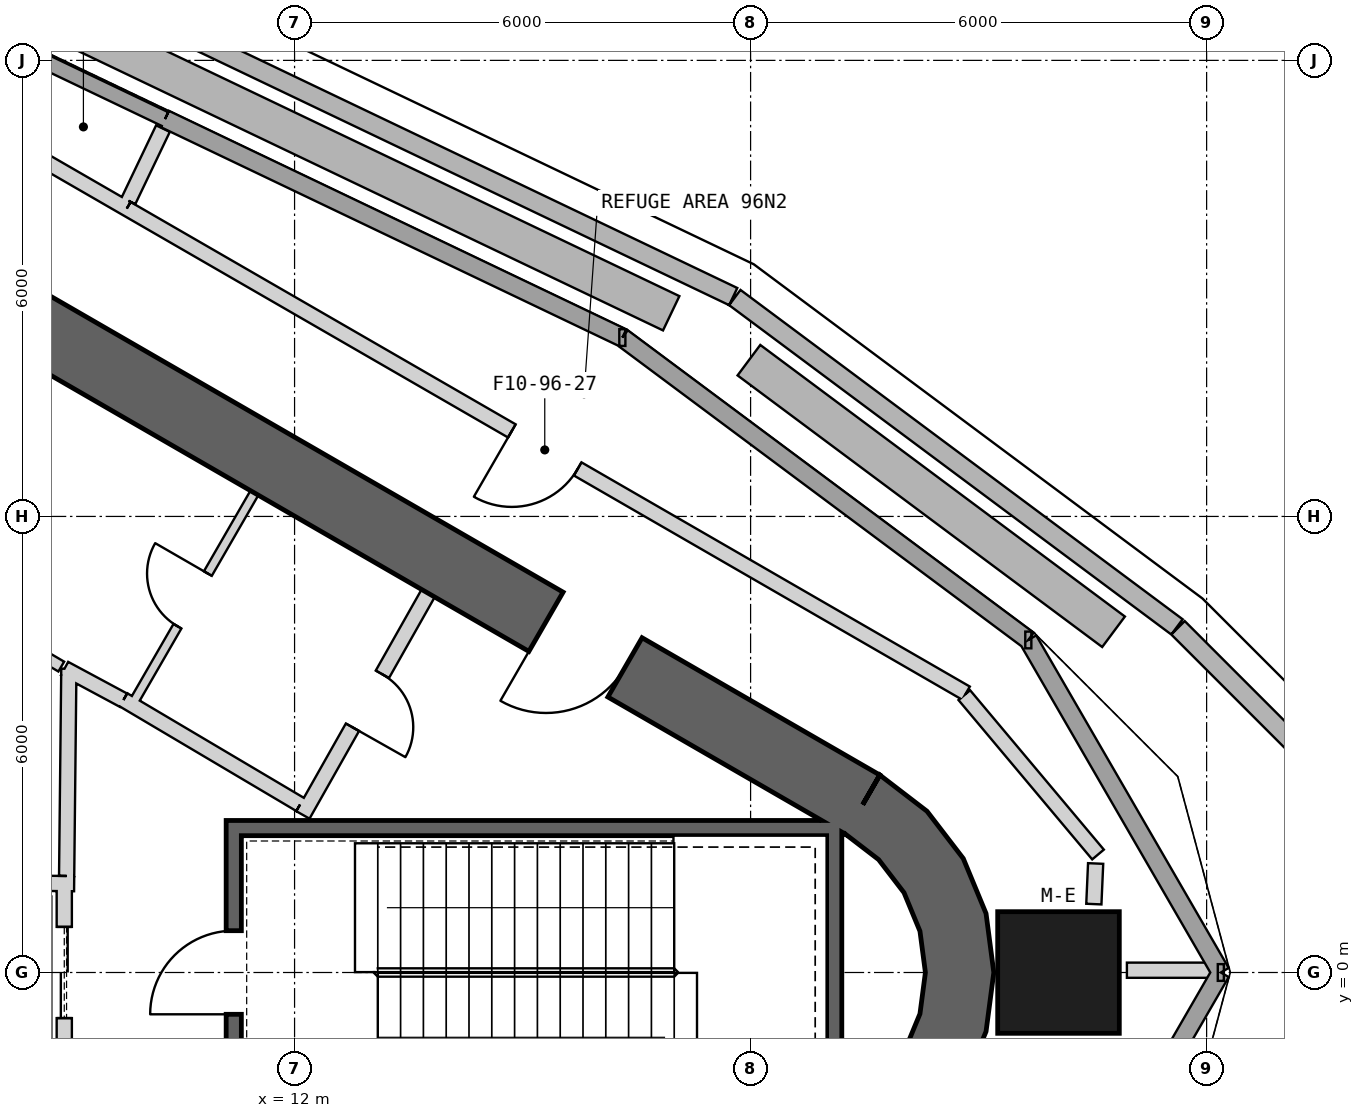
"""IFC4 building model, lengths in metres.
Left out: names, types, materials, properties, quantities, classifications, styles, units other than length and angle.
Written with IfcOpenShell. Run it as: python <this file> out.ifc"""

import sys

from ifc_helpers import new_model, si_unit, direction, frame, frame_2d, origin, origin_2d, place, context, subcontext, project, spatial, polyline, rectangle, outline, extrude, element, fill, save


model = new_model("IFC4")
c1 = context("Model", 3, precision=1e-05, world=origin(), true_north=direction((0.0, 1.0)))
c2 = subcontext(c1, "Body", "Model", "MODEL_VIEW")
j1 = project(units=[si_unit("LENGTHUNIT", "METRE"), si_unit("PLANEANGLEUNIT", "RADIAN")], contexts=[c1])
p1 = place(None, origin())
s1 = spatial("IfcSite", under=j1, at=p1, CompositionType="ELEMENT")
p2 = place(p1, origin())
s2 = spatial("IfcBuilding", under=s1, at=p2, CompositionType="ELEMENT")
p3 = place(p2, frame((0.0, 0.0, 425.3)))
s3 = spatial("IfcBuildingStorey", under=s2, at=p3, CompositionType="ELEMENT", Elevation=425.3)
p4 = place(p3, frame((22.051, 0.0, -0.25), z_axis=(0.0, 0.0, 1.0), x_axis=(1.0, 0.0, 0.0)))
e1 = element("IfcColumn", 1, at=p4, inside=s3, PredefinedType="COLUMN", context=c2, shape_type="SweptSolid", body=[
    extrude(rectangle(XDim=1.6, YDim=1.6, at=origin_2d()), origin(), (0.0, 0.0, 1.0), 5.25),
])
p5 = place(p3, frame((19.475, 2.208, 0.0), z_axis=(0.0, 0.0, 1.0), x_axis=(-0.866028369851, 0.499994862586, 0.0)))
e2 = element("IfcWall", 2, at=p5, inside=s3, PredefinedType="SHEAR", context=c2, shape_type="SweptSolid", body=[
    extrude(rectangle(XDim=31.523, YDim=0.9, at=frame_2d((15.762, 0.0))), origin(), (0.0, 0.0, 1.0), 5.0),
])
p6 = place(p5, frame((3.612, 0.0, 0.0)))
e3 = element("IfcOpeningElement", 3, at=p6, cuts=e2, PredefinedType="OPENING", context=c2, shape_type="SweptSolid", body=[
    extrude(rectangle(XDim=1.2, YDim=2.4, at=frame_2d((0.6, 1.2))), frame((0.0, 0.46, 0.0), z_axis=(0.0, -1.0, 0.0), x_axis=(1.0, 0.0, 0.0)), (0.0, 0.0, 1.0), 0.92),
])
p7 = place(p5, frame((26.712, 0.0, 0.0)))
e4 = element("IfcOpeningElement", 4, at=p7, cuts=e2, PredefinedType="OPENING", context=c2, shape_type="SweptSolid", body=[
    extrude(rectangle(XDim=1.2, YDim=2.4, at=frame_2d((0.6, 1.2))), frame((0.0, 0.46, 0.0), z_axis=(0.0, -1.0, 0.0), x_axis=(1.0, 0.0, 0.0)), (0.0, 0.0, 1.0), 0.92),
])
p8 = place(p3, origin())
e5 = element("IfcWall", 5, at=p8, inside=s3, PredefinedType="SHEAR", context=c2, shape_type="SweptSolid", body=[
    extrude(outline(polyline([(19.7, -2.598), (20.321, -2.121), (20.798, -1.5), (21.098, -0.777), (21.2, 0.0), (21.098, 0.777), (20.798, 1.5), (20.321, 2.121), (19.7, 2.598), (19.25, 1.819), (19.685, 1.485), (20.019, 1.05), (20.229, 0.543), (20.3, 0.0), (20.229, -0.543), (20.019, -1.05), (19.685, -1.485), (19.25, -1.819), (19.7, -2.598)])), origin(), (0.0, 0.0, 1.0), 5.0),
])
p9 = place(p3, frame((21.654, 4.375, 0.0), z_axis=(0.0, 0.0, 1.0), x_axis=(-0.802005747834, 0.597316315231, 0.0)))
e6 = element("IfcWall", 6, at=p9, inside=s3, PredefinedType="SOLIDWALL", context=c2, shape_type="SweptSolid", body=[
    extrude(rectangle(XDim=6.66, YDim=0.24, at=frame_2d((3.33, 0.0))), origin(), (0.0, 0.0, 1.0), 4.75),
])
p10 = place(p3, frame((16.312, 8.353, 0.0), z_axis=(0.0, 0.0, 1.0), x_axis=(-0.902308246331, 0.431091438795, 0.0)))
e7 = element("IfcWall", 7, at=p10, inside=s3, PredefinedType="SOLIDWALL", context=c2, shape_type="SweptSolid", body=[
    extrude(rectangle(XDim=6.668, YDim=0.24, at=frame_2d((3.334, 0.0))), origin(), (0.0, 0.0, 1.0), 4.75),
])
p11 = place(p3, frame((21.664, -4.365, 0.0), z_axis=(0.0, 0.0, 1.0), x_axis=(0.500383284559, 0.865804001223, 0.0)))
e8 = element("IfcWall", 8, at=p11, inside=s3, PredefinedType="SOLIDWALL", context=c2, shape_type="SweptSolid", body=[
    extrude(rectangle(XDim=5.042, YDim=0.24, at=frame_2d((2.521, 0.0))), origin(), (0.0, 0.0, 1.0), 4.75),
])
p12 = place(p3, frame((24.187, 0.0, 0.0), z_axis=(0.0, 0.0, 1.0), x_axis=(-0.501009618021, 0.86544171534, 0.0)))
e9 = element("IfcWall", 9, at=p12, inside=s3, PredefinedType="SOLIDWALL", context=c2, shape_type="SweptSolid", body=[
    extrude(rectangle(XDim=5.055, YDim=0.24, at=frame_2d((2.528, 0.0))), origin(), (0.0, 0.0, 1.0), 4.75),
])
p13 = place(p3, frame((10.295, 11.228, 0.0), z_axis=(0.0, 0.0, 1.0), x_axis=(-0.902319256172, 0.431068393577, 0.0)))
e10 = element("IfcWall", 10, at=p13, inside=s3, PredefinedType="SOLIDWALL", context=c2, shape_type="SweptSolid", body=[
    extrude(rectangle(XDim=6.629, YDim=0.2, at=frame_2d((3.314, 0.0))), origin(), (0.0, 0.0, 1.0), 4.75),
])
p14 = place(p13, frame((2.414, 0.0, 0.0)))
e11 = element("IfcOpeningElement", 11, at=p14, cuts=e10, PredefinedType="OPENING", context=c2, shape_type="SweptSolid", body=[
    extrude(rectangle(XDim=1.8, YDim=2.4, at=frame_2d((0.9, 1.2))), frame((0.0, 0.11, 0.0), z_axis=(0.0, -1.0, 0.0), x_axis=(1.0, 0.0, 0.0)), (0.0, 0.0, 1.0), 0.22),
])
p15 = place(p3, frame((23.624, 4.535, 0.04), z_axis=(0.0, 0.0, 1.0), x_axis=(0.707106781187, -0.707106781187, 0.0)))
e12 = element("IfcWall", 12, at=p15, inside=s3, PredefinedType="PARAPET", context=c2, shape_type="SweptSolid", body=[
    extrude(rectangle(XDim=2.728, YDim=0.25, at=frame_2d((1.364, 0.0))), origin(), (0.0, 0.0, 1.0), 1.2),
])
p16 = place(p3, frame((-2.057, 18.365, 0.04), z_axis=(0.0, 0.0, 1.0), x_axis=(0.90231764466, -0.431071766804, 0.0)))
e13 = element("IfcWall", 13, at=p16, inside=s3, PredefinedType="PARAPET", context=c2, shape_type="SweptSolid", body=[
    extrude(rectangle(XDim=21.975, YDim=0.25, at=frame_2d((10.987, 0.0))), origin(), (0.0, 0.0, 1.0), 1.2),
])
p17 = place(p3, frame((17.792, 8.88, 0.04), z_axis=(0.0, 0.0, 1.0), x_axis=(0.801990625962, -0.597336618557, 0.0)))
e14 = element("IfcWall", 14, at=p17, inside=s3, PredefinedType="PARAPET", context=c2, shape_type="SweptSolid", body=[
    extrude(rectangle(XDim=7.254, YDim=0.25, at=frame_2d((3.627, 0.0))), origin(), (0.0, 0.0, 1.0), 1.2),
])
p18 = place(p3, frame((-1.812, 17.639, 0.04), z_axis=(0.0, 0.0, 1.0), x_axis=(0.902316498724, -0.431074165463, 0.0)))
e15 = element("IfcWall", 15, at=p18, inside=s3, PredefinedType="PARAPET", context=c2, shape_type="SweptSolid", body=[
    extrude(rectangle(XDim=20.799, YDim=0.5, at=frame_2d((10.399, 0.0))), origin(), (0.0, 0.0, 1.0), 0.6),
])
p19 = place(p3, frame((17.978, 8.056, 0.04), z_axis=(0.0, 0.0, 1.0), x_axis=(0.801984037466, -0.597345464242, 0.0)))
e16 = element("IfcWall", 16, at=p19, inside=s3, PredefinedType="PARAPET", context=c2, shape_type="SweptSolid", body=[
    extrude(rectangle(XDim=5.982, YDim=0.5, at=frame_2d((2.991, 0.0))), origin(), (0.0, 0.0, 1.0), 0.6),
])
p20 = place(p3, frame((19.2, 1.9, -0.25), z_axis=(0.0, 0.0, 1.0), x_axis=(-1.0, 0.0, 0.0)))
e17 = element("IfcWall", 17, at=p20, inside=s3, PredefinedType="SHEAR", context=c2, shape_type="SweptSolid", body=[
    extrude(rectangle(XDim=8.1, YDim=0.2, at=frame_2d((4.05, 0.0))), origin(), (0.0, 0.0, 1.0), 5.0),
])
p21 = place(p3, frame((19.1, -2.0, -0.25), z_axis=(0.0, 0.0, 1.0), x_axis=(0.0, 1.0, 0.0)))
e18 = element("IfcWall", 18, at=p21, inside=s3, PredefinedType="SHEAR", context=c2, shape_type="SweptSolid", body=[
    extrude(rectangle(XDim=3.8, YDim=0.2, at=frame_2d((1.9, 0.0))), origin(), (0.0, 0.0, 1.0), 5.0),
])
p22 = place(p3, frame((11.2, -1.8, -0.25), z_axis=(0.0, 0.0, 1.0), x_axis=(0.0, 1.0, 0.0)))
e19 = element("IfcWall", 19, at=p22, inside=s3, PredefinedType="SHEAR", context=c2, shape_type="SweptSolid", body=[
    extrude(rectangle(XDim=3.6, YDim=0.2, at=frame_2d((1.8, 0.0))), origin(), (0.0, 0.0, 1.0), 5.0),
])
p23 = place(p22, frame((1.25, 0.0, 0.25)))
e20 = element("IfcOpeningElement", 20, at=p23, cuts=e19, PredefinedType="OPENING", context=c2, shape_type="SweptSolid", body=[
    extrude(rectangle(XDim=1.1, YDim=2.1, at=frame_2d((0.55, 1.05))), frame((0.0, 0.11, 0.0), z_axis=(0.0, -1.0, 0.0), x_axis=(1.0, 0.0, 0.0)), (0.0, 0.0, 1.0), 0.22),
])
p24 = place(p3, frame((8.97, 1.2, 0.0), z_axis=(0.0, 0.0, 1.0), x_axis=(0.0, -1.0, 0.0)))
e21 = element("IfcWall", 21, at=p24, inside=s3, PredefinedType="PLUMBINGWALL", context=c2, shape_type="SweptSolid", body=[
    extrude(rectangle(XDim=2.4, YDim=0.2, at=frame_2d((1.2, 0.0))), origin(), (0.0, 0.0, 1.0), 4.75),
])
p25 = place(p24, frame((0.6, 0.0, 0.0)))
e22 = element("IfcOpeningElement", 22, at=p25, cuts=e21, PredefinedType="OPENING", context=c2, shape_type="SweptSolid", body=[
    extrude(rectangle(XDim=1.2, YDim=2.4, at=frame_2d((0.6, 1.2))), frame((0.0, 0.11, 0.0), z_axis=(0.0, -1.0, 0.0), x_axis=(1.0, 0.0, 0.0)), (0.0, 0.0, 1.0), 0.22),
])
p26 = place(p3, frame((5.9, 1.201, 0.0), z_axis=(0.0, 0.0, 1.0), x_axis=(0.999950064753, -0.009993397809, 0.0)))
e23 = element("IfcWall", 23, at=p26, inside=s3, PredefinedType="PLUMBINGWALL", context=c2, shape_type="SweptSolid", body=[
    extrude(rectangle(XDim=3.2, YDim=0.2, at=frame_2d((1.6, 0.0))), origin(), (0.0, 0.0, 1.0), 4.75),
])
p27 = place(p3, frame((9.847, 3.495, 0.0), z_axis=(0.0, 0.0, 1.0), x_axis=(0.499984717929, 0.866034226713, 0.0)))
e24 = element("IfcWall", 24, at=p27, inside=s3, PredefinedType="PARTITIONING", context=c2, shape_type="SweptSolid", body=[
    extrude(rectangle(XDim=3.25, YDim=0.12, at=frame_2d((1.625, 0.0))), origin(), (0.0, 0.0, 1.0), 4.75),
])
p28 = place(p27, frame((1.225, 0.0, 0.0)))
e25 = element("IfcOpeningElement", 25, at=p28, cuts=e24, PredefinedType="OPENING", context=c2, shape_type="SweptSolid", body=[
    extrude(rectangle(XDim=0.8, YDim=2.1, at=frame_2d((0.4, 1.05))), frame((0.0, 0.07, 0.0), z_axis=(0.0, -1.0, 0.0), x_axis=(1.0, 0.0, 0.0)), (0.0, 0.0, 1.0), 0.14),
])
p29 = place(p3, frame((12.11, 2.073, 0.0), z_axis=(0.0, 0.0, 1.0), x_axis=(0.49196600604, 0.870614408852, 0.0)))
e26 = element("IfcWall", 26, at=p29, inside=s3, PredefinedType="PARTITIONING", context=c2, shape_type="SweptSolid", body=[
    extrude(rectangle(XDim=3.35, YDim=0.2, at=frame_2d((1.675, 0.0))), origin(), (0.0, 0.0, 1.0), 4.75),
])
p30 = place(p29, frame((1.325, 0.0, 0.0)))
e27 = element("IfcOpeningElement", 27, at=p30, cuts=e26, PredefinedType="OPENING", context=c2, shape_type="SweptSolid", body=[
    extrude(rectangle(XDim=0.8, YDim=2.1, at=frame_2d((0.4, 1.05))), frame((0.0, 0.11, 0.0), z_axis=(0.0, -1.0, 0.0), x_axis=(1.0, 0.0, 0.0)), (0.0, 0.0, 1.0), 0.22),
])
p31 = place(p3, frame((9.75, 3.587, 0.0), z_axis=(0.0, 0.0, 1.0), x_axis=(0.860414880418, -0.509594185166, 0.0)))
e28 = element("IfcWall", 28, at=p31, inside=s3, PredefinedType="PARTITIONING", context=c2, shape_type="SweptSolid", body=[
    extrude(rectangle(XDim=2.7, YDim=0.2, at=frame_2d((1.35, 0.0))), origin(), (0.0, 0.0, 1.0), 4.75),
])
p32 = place(p3, frame((8.974, 3.999, 0.0), z_axis=(0.0, 0.0, 1.0), x_axis=(0.880917147855, -0.473270513147, 0.0)))
e29 = element("IfcWall", 29, at=p32, inside=s3, PredefinedType="PARTITIONING", context=c2, shape_type="SweptSolid", body=[
    extrude(rectangle(XDim=0.878, YDim=0.2, at=frame_2d((0.439, 0.0))), origin(), (0.0, 0.0, 1.0), 4.75),
])
p33 = place(p3, frame((8.931, 4.025, 0.0), z_axis=(0.0, 0.0, 1.0), x_axis=(-0.862666884027, 0.505772525157, 0.0)))
e30 = element("IfcWall", 30, at=p33, inside=s3, PredefinedType="PLUMBINGWALL", context=c2, shape_type="SweptSolid", body=[
    extrude(rectangle(XDim=4.372, YDim=0.15, at=frame_2d((2.186, 0.0))), origin(), (0.0, 0.0, 1.0), 4.75),
])
p34 = place(p3, frame((9.001, 1.27, 0.0), z_axis=(0.0, 0.0, 1.0), x_axis=(0.01074821465, 0.999942236273, 0.0)))
e31 = element("IfcWall", 31, at=p34, inside=s3, PredefinedType="PARTITIONING", context=c2, shape_type="SweptSolid", body=[
    extrude(rectangle(XDim=2.726, YDim=0.2, at=frame_2d((1.363, 0.0))), origin(), (0.0, 0.0, 1.0), 4.75),
])
p35 = place(p3, frame((20.834, 3.675, 0.0), z_axis=(0.0, 0.0, 1.0), x_axis=(-0.866033490305, 0.499985993474, 0.0)))
e32 = element("IfcWall", 32, at=p35, inside=s3, PredefinedType="PARTITIONING", context=c2, shape_type="SweptSolid", body=[
    extrude(rectangle(XDim=12.75, YDim=0.2, at=frame_2d((6.375, 0.0))), origin(), (0.0, 0.0, 1.0), 4.75),
])
p36 = place(p35, frame((5.9, 0.0, 0.0)))
e33 = element("IfcOpeningElement", 33, at=p36, cuts=e32, PredefinedType="OPENING", context=c2, shape_type="SweptSolid", body=[
    extrude(rectangle(XDim=1.0, YDim=2.1, at=frame_2d((0.5, 1.05))), frame((0.0, 0.11, 0.0), z_axis=(0.0, -1.0, 0.0), x_axis=(1.0, 0.0, 0.0)), (0.0, 0.0, 1.0), 0.22),
])
p37 = place(p3, frame((9.792, 10.05, 0.0), z_axis=(0.0, 0.0, 1.0), x_axis=(-0.866022320763, 0.500005339912, 0.0)))
e34 = element("IfcWall", 34, at=p37, inside=s3, PredefinedType="PARTITIONING", context=c2, shape_type="SweptSolid", body=[
    extrude(rectangle(XDim=6.649, YDim=0.2, at=frame_2d((3.324, 0.0))), origin(), (0.0, 0.0, 1.0), 4.75),
])
p38 = place(p37, frame((2.856, 0.0, 0.0)))
e35 = element("IfcOpeningElement", 35, at=p38, cuts=e34, PredefinedType="OPENING", context=c2, shape_type="SweptSolid", body=[
    extrude(rectangle(XDim=1.0, YDim=2.1, at=frame_2d((0.5, 1.05))), frame((0.0, 0.11, 0.0), z_axis=(0.0, -1.0, 0.0), x_axis=(1.0, 0.0, 0.0)), (0.0, 0.0, 1.0), 0.22),
])
p39 = place(p3, frame((22.571, 1.552, 0.0), z_axis=(0.0, 0.0, 1.0), x_axis=(-0.642777788023, 0.766052684366, 0.0)))
e36 = element("IfcWall", 36, at=p39, inside=s3, PredefinedType="PARTITIONING", context=c2, shape_type="SweptSolid", body=[
    extrude(rectangle(XDim=2.737, YDim=0.2, at=frame_2d((1.369, 0.0))), origin(), (0.0, 0.0, 1.0), 4.75),
])
p40 = place(p3, frame((22.516, 0.9, 0.0), z_axis=(0.0, 0.0, 1.0), x_axis=(0.044289222506, 0.99901875096, 0.0)))
e37 = element("IfcWall", 37, at=p40, inside=s3, PredefinedType="PARTITIONING", context=c2, shape_type="SweptSolid", body=[
    extrude(rectangle(XDim=0.535, YDim=0.2, at=frame_2d((0.267, 0.0))), origin(), (0.0, 0.0, 1.0), 4.75),
])
p41 = place(p3, frame((10.269, 11.102, 0.0), z_axis=(0.0, 0.0, 1.0), x_axis=(-0.431274891071, -0.902220576318, 0.0)))
e38 = element("IfcWall", 38, at=p41, inside=s3, PredefinedType="PARTITIONING", context=c2, shape_type="SweptSolid", body=[
    extrude(rectangle(XDim=1.052, YDim=0.2, at=frame_2d((0.526, 0.0))), origin(), (0.0, 0.0, 1.0), 4.75),
])
p42 = place(p3, frame((22.951, 0.03, 0.0), z_axis=(0.0, 0.0, 1.0), x_axis=(1.0, 0.0, 0.0)))
e39 = element("IfcWall", 39, at=p42, inside=s3, PredefinedType="PARTITIONING", context=c2, shape_type="SweptSolid", body=[
    extrude(rectangle(XDim=1.098, YDim=0.2, at=frame_2d((0.549, 0.0))), origin(), (0.0, 0.0, 1.0), 3.93),
])
p43 = place(p23, origin())
e40 = element("IfcDoor", 40, at=p43, inside=s3, OperationType="SINGLE_SWING_LEFT", PredefinedType="USERDEFINED", context=c2, shape_type="SweptSolid", body=[
    extrude(rectangle(XDim=1.1, YDim=2.1, at=frame_2d((0.55, 1.05))), frame((0.0, 0.025, 0.0), z_axis=(0.0, -1.0, 0.0), x_axis=(1.0, 0.0, 0.0)), (0.0, 0.0, 1.0), 0.05),
])
fill(e20, e40)
p44 = place(p25, origin())
e41 = element("IfcDoor", 41, at=p44, inside=s3, OperationType="SLIDING_TO_LEFT", PredefinedType="USERDEFINED", context=c2, shape_type="SweptSolid", body=[
    extrude(rectangle(XDim=1.2, YDim=2.4, at=frame_2d((0.6, 1.2))), frame((0.0, 0.025, 0.0), z_axis=(0.0, -1.0, 0.0), x_axis=(1.0, 0.0, 0.0)), (0.0, 0.0, 1.0), 0.05),
])
fill(e22, e41)
p45 = place(p30, origin())
e42 = element("IfcDoor", 42, at=p45, inside=s3, OperationType="SINGLE_SWING_LEFT", PredefinedType="USERDEFINED", context=c2, shape_type="SweptSolid", body=[
    extrude(rectangle(XDim=0.8, YDim=2.1, at=frame_2d((0.4, 1.05))), frame((0.0, 0.025, 0.0), z_axis=(0.0, -1.0, 0.0), x_axis=(1.0, 0.0, 0.0)), (0.0, 0.0, 1.0), 0.05),
])
fill(e27, e42)
p46 = place(p36, origin())
e43 = element("IfcDoor", 43, at=p46, inside=s3, OperationType="SINGLE_SWING_RIGHT", PredefinedType="USERDEFINED", context=c2, shape_type="SweptSolid", body=[
    extrude(rectangle(XDim=1.0, YDim=2.1, at=frame_2d((0.5, 1.05))), frame((0.0, 0.025, 0.0), z_axis=(0.0, -1.0, 0.0), x_axis=(1.0, 0.0, 0.0)), (0.0, 0.0, 1.0), 0.05),
])
fill(e33, e43)
p47 = place(p28, origin())
e44 = element("IfcDoor", 44, at=p47, inside=s3, OperationType="SINGLE_SWING_RIGHT", PredefinedType="USERDEFINED", context=c2, shape_type="SweptSolid", body=[
    extrude(rectangle(XDim=0.8, YDim=2.1, at=frame_2d((0.4, 1.05))), frame((0.0, 0.025, 0.0), z_axis=(0.0, -1.0, 0.0), x_axis=(1.0, 0.0, 0.0)), (0.0, 0.0, 1.0), 0.05),
])
fill(e25, e44)
p48 = place(p6, origin())
e45 = element("IfcDoor", 45, at=p48, inside=s3, OperationType="SINGLE_SWING_RIGHT", PredefinedType="USERDEFINED", context=c2, shape_type="SweptSolid", body=[
    extrude(rectangle(XDim=1.2, YDim=2.4, at=frame_2d((0.6, 1.2))), frame((0.0, 0.025, 0.0), z_axis=(0.0, -1.0, 0.0), x_axis=(1.0, 0.0, 0.0)), (0.0, 0.0, 1.0), 0.05),
])
fill(e3, e45)
save(model, sys.argv[1])
